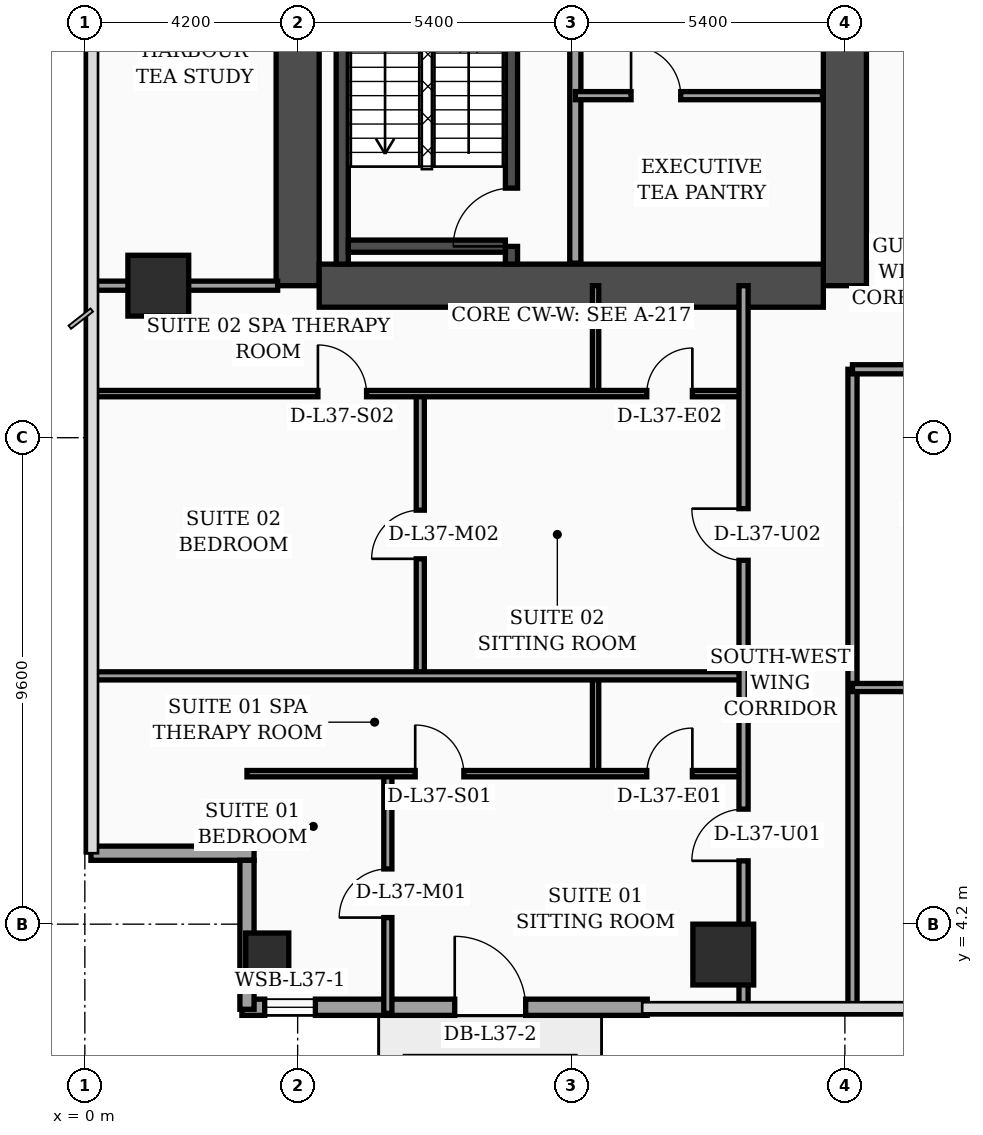
"""IFC4 building model, lengths in metres.
Left out: names, types, materials, properties, quantities, classifications, styles, units other than length and angle.
Written with IfcOpenShell. Run it as: python <this file> out.ifc"""

import sys

from ifc_helpers import new_model, si_unit, direction, frame, frame_2d, origin, origin_2d, place, context, subcontext, project, spatial, rectangle, hollow_rectangle, extrude, element, fill, save


model = new_model("IFC4")
c1 = context("Model", 3, precision=1e-05, world=origin(), true_north=direction((0.0, 1.0)))
c2 = subcontext(c1, "Body", "Model", "MODEL_VIEW")
j1 = project(units=[si_unit("LENGTHUNIT", "METRE"), si_unit("PLANEANGLEUNIT", "RADIAN")], contexts=[c1])
p1 = place(None, origin())
s1 = spatial("IfcSite", under=j1, at=p1, CompositionType="ELEMENT")
p2 = place(p1, origin())
s2 = spatial("IfcBuilding", under=s1, at=p2, CompositionType="ELEMENT")
p3 = place(p2, frame((0.0, 0.0, 152.3)))
s3 = spatial("IfcBuildingStorey", under=s2, at=p3, CompositionType="ELEMENT", Elevation=152.3)
p4 = place(p3, frame((4.2, 16.8, 0.0), z_axis=(0.0, 0.0, 1.0), x_axis=(0.0, 1.0, 0.0)))
e1 = element("IfcWall", 1, at=p4, inside=s3, PredefinedType="SHEAR", context=c2, shape_type="SweptSolid", body=[
    extrude(rectangle(XDim=21.6, YDim=0.85, at=frame_2d((10.8, 0.0))), origin(), (0.0, 0.0, 1.0), 3.56),
])
p5 = place(p3, frame((15.0, 16.8, 0.0), z_axis=(0.0, 0.0, 1.0), x_axis=(0.0, 1.0, 0.0)))
e2 = element("IfcWall", 2, at=p5, inside=s3, PredefinedType="SHEAR", context=c2, shape_type="SweptSolid", body=[
    extrude(rectangle(XDim=21.6, YDim=0.85, at=frame_2d((10.8, 0.0))), origin(), (0.0, 0.0, 1.0), 3.56),
])
p6 = place(p5, frame((8.65, 0.0, 0.0)))
e3 = element("IfcOpeningElement", 3, at=p6, cuts=e2, PredefinedType="OPENING", context=c2, shape_type="SweptSolid", body=[
    extrude(rectangle(XDim=1.1, YDim=2.2, at=frame_2d((0.55, 1.1))), frame((0.0, 0.435, 0.0), z_axis=(0.0, -1.0, 0.0), x_axis=(1.0, 0.0, 0.0)), (0.0, 0.0, 1.0), 0.87),
])
p7 = place(p5, frame((10.85, 0.0, 0.0)))
e4 = element("IfcOpeningElement", 4, at=p7, cuts=e2, PredefinedType="OPENING", context=c2, shape_type="SweptSolid", body=[
    extrude(rectangle(XDim=1.1, YDim=2.2, at=frame_2d((0.55, 1.1))), frame((0.0, 0.435, 0.0), z_axis=(0.0, -1.0, 0.0), x_axis=(1.0, 0.0, 0.0)), (0.0, 0.0, 1.0), 0.87),
])
p8 = place(p5, frame((13.5, 0.0, 0.0)))
e5 = element("IfcOpeningElement", 5, at=p8, cuts=e2, PredefinedType="OPENING", context=c2, shape_type="SweptSolid", body=[
    extrude(rectangle(XDim=1.1, YDim=2.2, at=frame_2d((0.55, 1.1))), frame((0.0, 0.435, 0.0), z_axis=(0.0, -1.0, 0.0), x_axis=(1.0, 0.0, 0.0)), (0.0, 0.0, 1.0), 0.87),
])
p9 = place(p5, frame((16.15, 0.0, 0.0)))
e6 = element("IfcOpeningElement", 6, at=p9, cuts=e2, PredefinedType="OPENING", context=c2, shape_type="SweptSolid", body=[
    extrude(rectangle(XDim=1.1, YDim=2.2, at=frame_2d((0.55, 1.1))), frame((0.0, 0.435, 0.0), z_axis=(0.0, -1.0, 0.0), x_axis=(1.0, 0.0, 0.0)), (0.0, 0.0, 1.0), 0.87),
])
p10 = place(p3, frame((4.625, 16.8, 0.0), z_axis=(0.0, 0.0, 1.0), x_axis=(1.0, 0.0, 0.0)))
e7 = element("IfcWall", 7, at=p10, inside=s3, PredefinedType="SHEAR", context=c2, shape_type="SweptSolid", body=[
    extrude(rectangle(XDim=9.95, YDim=0.85, at=frame_2d((4.975, 0.0))), origin(), (0.0, 0.0, 1.0), 3.56),
])
p11 = place(p3, frame((5.08, 17.225, 0.0), z_axis=(0.0, 0.0, 1.0), x_axis=(0.0, 1.0, 0.0)))
e8 = element("IfcWall", 8, at=p11, inside=s3, PredefinedType="SOLIDWALL", context=c2, shape_type="SweptSolid", body=[
    extrude(rectangle(XDim=9.565, YDim=0.24, at=frame_2d((4.782, 0.0))), origin(), (0.0, 0.0, 1.0), 3.56),
])
p12 = place(p3, frame((8.42, 17.225, 0.0), z_axis=(0.0, 0.0, 1.0), x_axis=(0.0, 1.0, 0.0)))
e9 = element("IfcWall", 9, at=p12, inside=s3, PredefinedType="SOLIDWALL", context=c2, shape_type="SweptSolid", body=[
    extrude(rectangle(XDim=9.565, YDim=0.24, at=frame_2d((4.782, 0.0))), origin(), (0.0, 0.0, 1.0), 3.56),
])
p13 = place(p12, frame((0.35, 0.0, 0.0)))
e10 = element("IfcOpeningElement", 10, at=p13, cuts=e9, PredefinedType="OPENING", context=c2, shape_type="SweptSolid", body=[
    extrude(rectangle(XDim=1.15, YDim=2.2, at=frame_2d((0.575, 1.1))), frame((0.0, 0.13, 0.0), z_axis=(0.0, -1.0, 0.0), x_axis=(1.0, 0.0, 0.0)), (0.0, 0.0, 1.0), 0.26),
])
p14 = place(p3, frame((5.2, 17.58, 0.0), z_axis=(0.0, 0.0, 1.0), x_axis=(1.0, 0.0, 0.0)))
e11 = element("IfcWall", 11, at=p14, inside=s3, PredefinedType="SOLIDWALL", context=c2, shape_type="SweptSolid", body=[
    extrude(rectangle(XDim=3.1, YDim=0.24, at=frame_2d((1.55, 0.0))), origin(), (0.0, 0.0, 1.0), 3.56),
])
p15 = place(p3, frame((3.6, 3.6, 0.0), z_axis=(0.0, 0.0, 1.0), x_axis=(1.0, 0.0, 0.0)))
e12 = element("IfcColumn", 12, at=p15, inside=s3, PredefinedType="COLUMN", context=c2, shape_type="SweptSolid", body=[
    extrude(hollow_rectangle(XDim=0.85, YDim=0.85, WallThickness=0.036, at=origin_2d()), origin(), (0.0, 0.0, 1.0), 3.56),
])
for number, where, z_axis, x_axis in (
    (13, (1.45, 16.8, 0.0), (0.0, 0.0, 1.0), (1.0, 0.0, 0.0)),
    (14, (12.6, 3.6, 0.0), (0.0, 0.0, 1.0), (1.0, 0.0, 0.0)),
):
    element("IfcColumn", number, at=place(p3, frame(where, z_axis=z_axis, x_axis=x_axis)), inside=s3, PredefinedType="COLUMN", context=c2, shape_type="SweptSolid", body=[
        extrude(rectangle(XDim=1.2, YDim=1.2, at=origin_2d()), origin(), (0.0, 0.0, 1.0), 3.56),
    ])
p16 = place(p3, frame((3.1, 2.56, 0.0), z_axis=(0.0, 0.0, 1.0), x_axis=(1.0, 0.0, 0.0)))
e15 = element("IfcWall", 15, at=p16, inside=s3, PredefinedType="SOLIDWALL", context=c2, shape_type="SweptSolid", body=[
    extrude(rectangle(XDim=8.0, YDim=0.32, at=frame_2d((4.0, 0.0))), origin(), (0.0, 0.0, 1.0), 3.56),
])
p17 = place(p16, frame((0.45, 0.0, 0.75)))
e16 = element("IfcOpeningElement", 16, at=p17, cuts=e15, PredefinedType="OPENING", context=c2, shape_type="SweptSolid", body=[
    extrude(rectangle(XDim=1.0, YDim=1.6, at=frame_2d((0.5, 0.8))), frame((0.0, 0.17, 0.0), z_axis=(0.0, -1.0, 0.0), x_axis=(1.0, 0.0, 0.0)), (0.0, 0.0, 1.0), 0.34),
])
p18 = place(p16, frame((4.2, 0.0, 0.0)))
e17 = element("IfcOpeningElement", 17, at=p18, cuts=e15, PredefinedType="OPENING", context=c2, shape_type="SweptSolid", body=[
    extrude(rectangle(XDim=1.4, YDim=2.25, at=frame_2d((0.7, 1.125))), frame((0.0, 0.17, 0.0), z_axis=(0.0, -1.0, 0.0), x_axis=(1.0, 0.0, 0.0)), (0.0, 0.0, 1.0), 0.34),
])
p19 = place(p3, frame((0.12, 5.6, 0.0), z_axis=(0.0, 0.0, 1.0), x_axis=(1.0, 0.0, 0.0)))
e18 = element("IfcWall", 18, at=p19, inside=s3, PredefinedType="SOLIDWALL", context=c2, shape_type="SweptSolid", body=[
    extrude(rectangle(XDim=3.22, YDim=0.28, at=frame_2d((1.61, 0.0))), origin(), (0.0, 0.0, 1.0), 2.94),
])
p20 = place(p3, frame((3.2, 5.46, 0.0), z_axis=(0.0, 0.0, 1.0), x_axis=(0.0, -1.0, 0.0)))
e19 = element("IfcWall", 19, at=p20, inside=s3, PredefinedType="SOLIDWALL", context=c2, shape_type="SweptSolid", body=[
    extrude(rectangle(XDim=2.94, YDim=0.28, at=frame_2d((1.47, 0.0))), origin(), (0.0, 0.0, 1.0), 2.94),
])
p21 = place(p3, frame((9.68, 17.245, 0.0), z_axis=(0.0, 0.0, 1.0), x_axis=(0.0, 1.0, 0.0)))
e20 = element("IfcWall", 20, at=p21, inside=s3, PredefinedType="SOLIDWALL", context=c2, shape_type="SweptSolid", body=[
    extrude(rectangle(XDim=7.755, YDim=0.22, at=frame_2d((3.877, 0.0))), origin(), (0.0, 0.0, 1.0), 3.56),
])
p22 = place(p3, frame((9.68, 20.55, 0.0), z_axis=(0.0, 0.0, 1.0), x_axis=(1.0, 0.0, 0.0)))
e21 = element("IfcWall", 21, at=p22, inside=s3, PredefinedType="PARTITIONING", context=c2, shape_type="SweptSolid", body=[
    extrude(rectangle(XDim=4.875, YDim=0.16, at=frame_2d((2.438, 0.0))), origin(), (0.0, 0.0, 1.0), 3.56),
])
p23 = place(p22, frame((1.1, 0.0, 0.0)))
e22 = element("IfcOpeningElement", 22, at=p23, cuts=e21, PredefinedType="OPENING", context=c2, shape_type="SweptSolid", body=[
    extrude(rectangle(XDim=0.98, YDim=2.15, at=frame_2d((0.49, 1.075))), frame((0.0, 0.09, 0.0), z_axis=(0.0, -1.0, 0.0), x_axis=(1.0, 0.0, 0.0)), (0.0, 0.0, 1.0), 0.18),
])
p24 = place(p3, frame((0.08, 16.8, 0.0), z_axis=(0.0, 0.0, 1.0), x_axis=(1.0, 0.0, 0.0)))
e23 = element("IfcWall", 23, at=p24, inside=s3, PredefinedType="PARTITIONING", context=c2, shape_type="SweptSolid", body=[
    extrude(rectangle(XDim=3.725, YDim=0.18, at=frame_2d((1.862, 0.0))), origin(), (0.0, 0.0, 1.0), 2.94),
])
p25 = place(p3, frame((10.08, 7.17, 0.0), z_axis=(0.0, 0.0, 1.0), x_axis=(0.0, 1.0, 0.0)))
e24 = element("IfcWall", 24, at=p25, inside=s3, PredefinedType="PARTITIONING", context=c2, shape_type="SweptSolid", body=[
    extrude(rectangle(XDim=1.93, YDim=0.125, at=frame_2d((0.965, 0.0))), origin(), (0.0, 0.0, 1.0), 3.09),
])
p26 = place(p3, frame((5.98, 2.44, 0.0), z_axis=(0.0, 0.0, 1.0), x_axis=(0.0, 1.0, 0.0)))
e25 = element("IfcWall", 25, at=p26, inside=s3, PredefinedType="PARTITIONING", context=c2, shape_type="SweptSolid", body=[
    extrude(rectangle(XDim=4.73, YDim=0.16, at=frame_2d((2.365, 0.0))), origin(), (0.0, 0.0, 1.0), 3.04),
])
p27 = place(p26, frame((1.89, 0.0, 0.0)))
e26 = element("IfcOpeningElement", 26, at=p27, cuts=e25, PredefinedType="OPENING", context=c2, shape_type="SweptSolid", body=[
    extrude(rectangle(XDim=0.96, YDim=2.2, at=frame_2d((0.48, 1.1))), frame((0.0, 0.09, 0.0), z_axis=(0.0, -1.0, 0.0), x_axis=(1.0, 0.0, 0.0)), (0.0, 0.0, 1.0), 0.18),
])
p28 = place(p3, frame((3.2, 7.17, 0.0), z_axis=(0.0, 0.0, 1.0), x_axis=(1.0, 0.0, 0.0)))
e27 = element("IfcWall", 27, at=p28, inside=s3, PredefinedType="PARTITIONING", context=c2, shape_type="SweptSolid", body=[
    extrude(rectangle(XDim=9.8, YDim=0.125, at=frame_2d((4.9, 0.0))), origin(), (0.0, 0.0, 1.0), 2.94),
])
p29 = place(p28, frame((3.32, 0.0, 0.0)))
e28 = element("IfcOpeningElement", 28, at=p29, cuts=e27, PredefinedType="OPENING", context=c2, shape_type="SweptSolid", body=[
    extrude(rectangle(XDim=0.96, YDim=2.2, at=frame_2d((0.48, 1.1))), frame((0.0, 0.073, 0.0), z_axis=(0.0, -1.0, 0.0), x_axis=(1.0, 0.0, 0.0)), (0.0, 0.0, 1.0), 0.145),
])
p30 = place(p28, frame((7.89, 0.0, 0.0)))
e29 = element("IfcOpeningElement", 29, at=p30, cuts=e27, PredefinedType="OPENING", context=c2, shape_type="SweptSolid", body=[
    extrude(rectangle(XDim=0.9, YDim=2.15, at=frame_2d((0.45, 1.075))), frame((0.0, 0.073, 0.0), z_axis=(0.0, -1.0, 0.0), x_axis=(1.0, 0.0, 0.0)), (0.0, 0.0, 1.0), 0.145),
])
p31 = place(p3, frame((10.08, 14.67, 0.0), z_axis=(0.0, 0.0, 1.0), x_axis=(0.0, 1.0, 0.0)))
e30 = element("IfcWall", 30, at=p31, inside=s3, PredefinedType="PARTITIONING", context=c2, shape_type="SweptSolid", body=[
    extrude(rectangle(XDim=2.13, YDim=0.125, at=frame_2d((1.065, 0.0))), origin(), (0.0, 0.0, 1.0), 3.56),
])
p32 = place(p3, frame((6.62, 9.1, 0.0), z_axis=(0.0, 0.0, 1.0), x_axis=(0.0, 1.0, 0.0)))
e31 = element("IfcWall", 31, at=p32, inside=s3, PredefinedType="PARTITIONING", context=c2, shape_type="SweptSolid", body=[
    extrude(rectangle(XDim=5.57, YDim=0.16, at=frame_2d((2.785, 0.0))), origin(), (0.0, 0.0, 1.0), 3.14),
])
p33 = place(p32, frame((2.31, 0.0, 0.0)))
e32 = element("IfcOpeningElement", 32, at=p33, cuts=e31, PredefinedType="OPENING", context=c2, shape_type="SweptSolid", body=[
    extrude(rectangle(XDim=0.96, YDim=2.2, at=frame_2d((0.48, 1.1))), frame((0.0, 0.09, 0.0), z_axis=(0.0, -1.0, 0.0), x_axis=(1.0, 0.0, 0.0)), (0.0, 0.0, 1.0), 0.18),
])
p34 = place(p3, frame((0.08, 14.67, 0.0), z_axis=(0.0, 0.0, 1.0), x_axis=(1.0, 0.0, 0.0)))
e33 = element("IfcWall", 33, at=p34, inside=s3, PredefinedType="PARTITIONING", context=c2, shape_type="SweptSolid", body=[
    extrude(rectangle(XDim=12.92, YDim=0.125, at=frame_2d((6.46, 0.0))), origin(), (0.0, 0.0, 1.0), 2.94),
])
p35 = place(p34, frame((4.52, 0.0, 0.0)))
e34 = element("IfcOpeningElement", 34, at=p35, cuts=e33, PredefinedType="OPENING", context=c2, shape_type="SweptSolid", body=[
    extrude(rectangle(XDim=0.96, YDim=2.2, at=frame_2d((0.48, 1.1))), frame((0.0, 0.073, 0.0), z_axis=(0.0, -1.0, 0.0), x_axis=(1.0, 0.0, 0.0)), (0.0, 0.0, 1.0), 0.145),
])
p36 = place(p34, frame((11.01, 0.0, 0.0)))
e35 = element("IfcOpeningElement", 35, at=p36, cuts=e33, PredefinedType="OPENING", context=c2, shape_type="SweptSolid", body=[
    extrude(rectangle(XDim=0.9, YDim=2.15, at=frame_2d((0.45, 1.075))), frame((0.0, 0.073, 0.0), z_axis=(0.0, -1.0, 0.0), x_axis=(1.0, 0.0, 0.0)), (0.0, 0.0, 1.0), 0.145),
])
p37 = place(p3, frame((0.08, 9.1, 0.0), z_axis=(0.0, 0.0, 1.0), x_axis=(1.0, 0.0, 0.0)))
e36 = element("IfcWall", 36, at=p37, inside=s3, PredefinedType="PARTITIONING", context=c2, shape_type="SweptSolid", body=[
    extrude(rectangle(XDim=12.92, YDim=0.16, at=frame_2d((6.46, 0.0))), origin(), (0.0, 0.0, 1.0), 2.94),
])
p38 = place(p3, frame((13.0, 2.44, 0.0), z_axis=(0.0, 0.0, 1.0), x_axis=(0.0, 1.0, 0.0)))
e37 = element("IfcWall", 37, at=p38, inside=s3, PredefinedType="PARTITIONING", context=c2, shape_type="SweptSolid", body=[
    extrude(rectangle(XDim=14.36, YDim=0.18, at=frame_2d((7.18, 0.0))), origin(), (0.0, 0.0, 1.0), 2.94),
])
p39 = place(p38, frame((3.01, 0.0, 0.0)))
e38 = element("IfcOpeningElement", 38, at=p39, cuts=e37, PredefinedType="OPENING", context=c2, shape_type="SweptSolid", body=[
    extrude(rectangle(XDim=1.02, YDim=2.2, at=frame_2d((0.51, 1.1))), frame((0.0, 0.1, 0.0), z_axis=(0.0, -1.0, 0.0), x_axis=(1.0, 0.0, 0.0)), (0.0, 0.0, 1.0), 0.2),
])
p40 = place(p38, frame((8.94, 0.0, 0.0)))
e39 = element("IfcOpeningElement", 39, at=p40, cuts=e37, PredefinedType="OPENING", context=c2, shape_type="SweptSolid", body=[
    extrude(rectangle(XDim=1.02, YDim=2.2, at=frame_2d((0.51, 1.1))), frame((0.0, 0.1, 0.0), z_axis=(0.0, -1.0, 0.0), x_axis=(1.0, 0.0, 0.0)), (0.0, 0.0, 1.0), 0.2),
])
p41 = place(p3, frame((15.15, 2.44, 0.0), z_axis=(0.0, 0.0, 1.0), x_axis=(0.0, 1.0, 0.0)))
e40 = element("IfcWall", 40, at=p41, inside=s3, PredefinedType="PARTITIONING", context=c2, shape_type="SweptSolid", body=[
    extrude(rectangle(XDim=12.71, YDim=0.18, at=frame_2d((6.355, 0.0))), origin(), (0.0, 0.0, 1.0), 3.04),
])
p42 = place(p3, frame((15.15, 8.87, 0.0), z_axis=(0.0, 0.0, 1.0), x_axis=(1.0, 0.0, 0.0)))
e41 = element("IfcWall", 41, at=p42, inside=s3, PredefinedType="PARTITIONING", context=c2, shape_type="SweptSolid", body=[
    extrude(rectangle(XDim=4.45, YDim=0.16, at=frame_2d((2.225, 0.0))), origin(), (0.0, 0.0, 1.0), 3.56),
])
p43 = place(p42, frame((1.75, 0.0, 0.0)))
e42 = element("IfcOpeningElement", 42, at=p43, cuts=e41, PredefinedType="OPENING", context=c2, shape_type="SweptSolid", body=[
    extrude(rectangle(XDim=0.96, YDim=2.2, at=frame_2d((0.48, 1.1))), frame((0.0, 0.09, 0.0), z_axis=(0.0, -1.0, 0.0), x_axis=(1.0, 0.0, 0.0)), (0.0, 0.0, 1.0), 0.18),
])
p44 = place(p3, frame((15.15, 15.15, 0.0), z_axis=(0.0, 0.0, 1.0), x_axis=(1.0, 0.0, 0.0)))
e43 = element("IfcWall", 43, at=p44, inside=s3, PredefinedType="PARTITIONING", context=c2, shape_type="SweptSolid", body=[
    extrude(rectangle(XDim=6.45, YDim=0.18, at=frame_2d((3.225, 0.0))), origin(), (0.0, 0.0, 1.0), 2.49),
])
p45 = place(p44, frame((1.74, 0.0, 0.0)))
e44 = element("IfcOpeningElement", 44, at=p45, cuts=e43, PredefinedType="OPENING", context=c2, shape_type="SweptSolid", body=[
    extrude(rectangle(XDim=1.02, YDim=2.2, at=frame_2d((0.51, 1.1))), frame((0.0, 0.1, 0.0), z_axis=(0.0, -1.0, 0.0), x_axis=(1.0, 0.0, 0.0)), (0.0, 0.0, 1.0), 0.2),
])
p46 = place(p17, origin())
e45 = element("IfcWindow", 45, at=p46, inside=s3, PartitioningType="SINGLE_PANEL", PredefinedType="WINDOW", context=c2, shape_type="SweptSolid", body=[
    extrude(rectangle(XDim=1.0, YDim=1.6, at=frame_2d((0.5, 0.8))), frame((0.0, 0.03, 0.0), z_axis=(0.0, -1.0, 0.0), x_axis=(1.0, 0.0, 0.0)), (0.0, 0.0, 1.0), 0.06),
])
fill(e16, e45)
p47 = place(p18, origin())
e46 = element("IfcDoor", 46, at=p47, inside=s3, OperationType="SINGLE_SWING_LEFT", PredefinedType="DOOR", context=c2, shape_type="SweptSolid", body=[
    extrude(rectangle(XDim=1.4, YDim=2.25, at=frame_2d((0.7, 1.125))), frame((0.0, 0.025, 0.0), z_axis=(0.0, -1.0, 0.0), x_axis=(1.0, 0.0, 0.0)), (0.0, 0.0, 1.0), 0.05),
])
fill(e17, e46)
p48 = place(p23, origin())
e47 = element("IfcDoor", 47, at=p48, inside=s3, OperationType="SINGLE_SWING_LEFT", PredefinedType="DOOR", context=c2, shape_type="SweptSolid", body=[
    extrude(rectangle(XDim=0.98, YDim=2.15, at=frame_2d((0.49, 1.075))), frame((0.0, 0.025, 0.0), z_axis=(0.0, -1.0, 0.0), x_axis=(1.0, 0.0, 0.0)), (0.0, 0.0, 1.0), 0.05),
])
fill(e22, e47)
p49 = place(p27, origin())
e48 = element("IfcDoor", 48, at=p49, inside=s3, OperationType="SINGLE_SWING_LEFT", PredefinedType="DOOR", context=c2, shape_type="SweptSolid", body=[
    extrude(rectangle(XDim=0.96, YDim=2.2, at=frame_2d((0.48, 1.1))), frame((0.0, 0.025, 0.0), z_axis=(0.0, -1.0, 0.0), x_axis=(1.0, 0.0, 0.0)), (0.0, 0.0, 1.0), 0.05),
])
fill(e26, e48)
p50 = place(p29, origin())
e49 = element("IfcDoor", 49, at=p50, inside=s3, OperationType="SINGLE_SWING_LEFT", PredefinedType="DOOR", context=c2, shape_type="SweptSolid", body=[
    extrude(rectangle(XDim=0.96, YDim=2.2, at=frame_2d((0.48, 1.1))), frame((0.0, 0.025, 0.0), z_axis=(0.0, -1.0, 0.0), x_axis=(1.0, 0.0, 0.0)), (0.0, 0.0, 1.0), 0.05),
])
fill(e28, e49)
p51 = place(p30, origin())
e50 = element("IfcDoor", 50, at=p51, inside=s3, OperationType="SINGLE_SWING_RIGHT", PredefinedType="DOOR", context=c2, shape_type="SweptSolid", body=[
    extrude(rectangle(XDim=0.9, YDim=2.15, at=frame_2d((0.45, 1.075))), frame((0.0, 0.025, 0.0), z_axis=(0.0, -1.0, 0.0), x_axis=(1.0, 0.0, 0.0)), (0.0, 0.0, 1.0), 0.05),
])
fill(e29, e50)
p52 = place(p33, origin())
e51 = element("IfcDoor", 51, at=p52, inside=s3, OperationType="SINGLE_SWING_LEFT", PredefinedType="DOOR", context=c2, shape_type="SweptSolid", body=[
    extrude(rectangle(XDim=0.96, YDim=2.2, at=frame_2d((0.48, 1.1))), frame((0.0, 0.025, 0.0), z_axis=(0.0, -1.0, 0.0), x_axis=(1.0, 0.0, 0.0)), (0.0, 0.0, 1.0), 0.05),
])
fill(e32, e51)
p53 = place(p35, origin())
e52 = element("IfcDoor", 52, at=p53, inside=s3, OperationType="SINGLE_SWING_LEFT", PredefinedType="DOOR", context=c2, shape_type="SweptSolid", body=[
    extrude(rectangle(XDim=0.96, YDim=2.2, at=frame_2d((0.48, 1.1))), frame((0.0, 0.025, 0.0), z_axis=(0.0, -1.0, 0.0), x_axis=(1.0, 0.0, 0.0)), (0.0, 0.0, 1.0), 0.05),
])
fill(e34, e52)
p54 = place(p36, origin())
e53 = element("IfcDoor", 53, at=p54, inside=s3, OperationType="SINGLE_SWING_RIGHT", PredefinedType="DOOR", context=c2, shape_type="SweptSolid", body=[
    extrude(rectangle(XDim=0.9, YDim=2.15, at=frame_2d((0.45, 1.075))), frame((0.0, 0.025, 0.0), z_axis=(0.0, -1.0, 0.0), x_axis=(1.0, 0.0, 0.0)), (0.0, 0.0, 1.0), 0.05),
])
fill(e35, e53)
p55 = place(p39, origin())
e54 = element("IfcDoor", 54, at=p55, inside=s3, OperationType="SINGLE_SWING_LEFT", PredefinedType="DOOR", context=c2, shape_type="SweptSolid", body=[
    extrude(rectangle(XDim=1.02, YDim=2.2, at=frame_2d((0.51, 1.1))), frame((0.0, 0.025, 0.0), z_axis=(0.0, -1.0, 0.0), x_axis=(1.0, 0.0, 0.0)), (0.0, 0.0, 1.0), 0.05),
])
fill(e38, e54)
p56 = place(p40, origin())
e55 = element("IfcDoor", 55, at=p56, inside=s3, OperationType="SINGLE_SWING_RIGHT", PredefinedType="DOOR", context=c2, shape_type="SweptSolid", body=[
    extrude(rectangle(XDim=1.02, YDim=2.2, at=frame_2d((0.51, 1.1))), frame((0.0, 0.025, 0.0), z_axis=(0.0, -1.0, 0.0), x_axis=(1.0, 0.0, 0.0)), (0.0, 0.0, 1.0), 0.05),
])
fill(e39, e55)
p57 = place(p13, origin())
e56 = element("IfcDoor", 56, at=p57, inside=s3, OperationType="SINGLE_SWING_LEFT", PredefinedType="DOOR", context=c2, shape_type="SweptSolid", body=[
    extrude(rectangle(XDim=1.15, YDim=2.2, at=frame_2d((0.575, 1.1))), frame((0.0, 0.025, 0.0), z_axis=(0.0, -1.0, 0.0), x_axis=(1.0, 0.0, 0.0)), (0.0, 0.0, 1.0), 0.05),
])
fill(e10, e56)
save(model, sys.argv[1])
